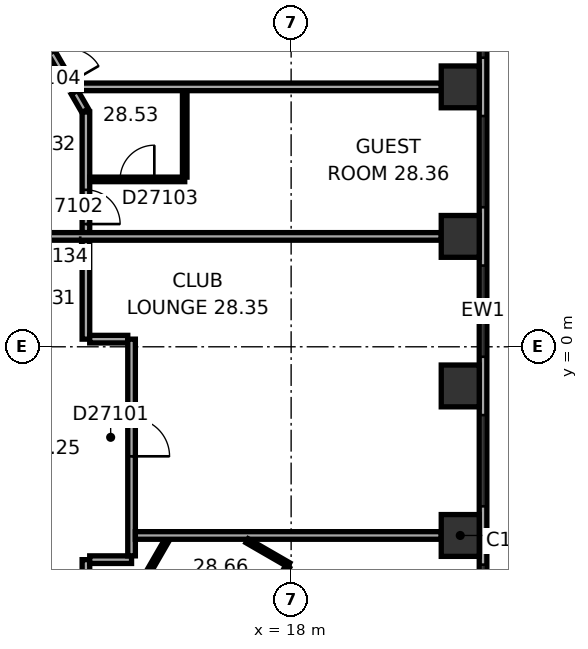
"""IFC4 building model, lengths in metres.
Left out: names, types, materials, properties, quantities, classifications, styles, units other than length and angle.
Written with IfcOpenShell. Run it as: python <this file> out.ifc"""

import sys

from ifc_helpers import new_model, si_unit, direction, frame, frame_2d, origin, origin_2d, place, context, subcontext, project, spatial, rectangle, extrude, element, fill, save


model = new_model("IFC4")
c1 = context("Model", 3, precision=1e-05, world=origin(), true_north=direction((0.0, 1.0)))
c2 = subcontext(c1, "Body", "Model", "MODEL_VIEW")
j1 = project(units=[si_unit("LENGTHUNIT", "METRE"), si_unit("PLANEANGLEUNIT", "RADIAN")], contexts=[c1])
p1 = place(None, origin())
s1 = spatial("IfcSite", under=j1, at=p1, CompositionType="ELEMENT")
p2 = place(p1, origin())
s2 = spatial("IfcBuilding", under=s1, at=p2, CompositionType="ELEMENT")
p3 = place(p2, frame((0.0, 0.0, 116.6)))
s3 = spatial("IfcBuildingStorey", under=s2, at=p3, CompositionType="ELEMENT", Elevation=116.6)
for number, where, z_axis, x_axis in (
    (1, (22.45, -4.965, 0.0), (0.0, 0.0, 1.0), (0.0, 1.0, 0.0)),
    (2, (22.45, -1.03, 0.0), (0.0, 0.0, 1.0), (0.0, 1.0, 0.0)),
    (3, (22.45, 2.905, 0.0), (0.0, 0.0, 1.0), (0.0, 1.0, 0.0)),
    (4, (22.45, 6.839, 0.0), (0.0, 0.0, 1.0), (0.0, 1.0, 0.0)),
):
    element("IfcColumn", number, at=place(p3, frame(where, z_axis=z_axis, x_axis=x_axis)), inside=s3, PredefinedType="COLUMN", context=c2, shape_type="SweptSolid", body=[
        extrude(rectangle(XDim=1.1, YDim=1.0, at=origin_2d()), origin(), (0.0, 0.0, 1.0), 3.3),
    ])
p4 = place(p3, frame((23.05, -9.687, 0.0), z_axis=(0.0, 0.0, 1.0), x_axis=(0.0, 1.0, 0.0)))
e5 = element("IfcWall", 5, at=p4, inside=s3, PredefinedType="STANDARD", context=c2, shape_type="SweptSolid", body=[
    extrude(rectangle(XDim=21.246, YDim=0.2, at=frame_2d((10.623, 0.0))), origin(), (0.0, 0.0, 1.0), 3.3),
])
p5 = place(p4, frame((1.555, 0.0, 0.8)))
e6 = element("IfcOpeningElement", 6, at=p5, cuts=e5, PredefinedType="OPENING", context=c2, shape_type="SweptSolid", body=[
    extrude(rectangle(XDim=2.4, YDim=1.7, at=frame_2d((1.2, 0.85))), frame((0.0, 0.11, 0.0), z_axis=(0.0, -1.0, 0.0), x_axis=(1.0, 0.0, 0.0)), (0.0, 0.0, 1.0), 0.22),
])
p6 = place(p4, frame((5.489, 0.0, 0.8)))
e7 = element("IfcOpeningElement", 7, at=p6, cuts=e5, PredefinedType="OPENING", context=c2, shape_type="SweptSolid", body=[
    extrude(rectangle(XDim=2.4, YDim=1.7, at=frame_2d((1.2, 0.85))), frame((0.0, 0.11, 0.0), z_axis=(0.0, -1.0, 0.0), x_axis=(1.0, 0.0, 0.0)), (0.0, 0.0, 1.0), 0.22),
])
p7 = place(p4, frame((9.424, 0.0, 0.8)))
e8 = element("IfcOpeningElement", 8, at=p7, cuts=e5, PredefinedType="OPENING", context=c2, shape_type="SweptSolid", body=[
    extrude(rectangle(XDim=2.4, YDim=1.7, at=frame_2d((1.2, 0.85))), frame((0.0, 0.11, 0.0), z_axis=(0.0, -1.0, 0.0), x_axis=(1.0, 0.0, 0.0)), (0.0, 0.0, 1.0), 0.22),
])
p8 = place(p4, frame((13.358, 0.0, 0.8)))
e9 = element("IfcOpeningElement", 9, at=p8, cuts=e5, PredefinedType="OPENING", context=c2, shape_type="SweptSolid", body=[
    extrude(rectangle(XDim=2.4, YDim=1.7, at=frame_2d((1.2, 0.85))), frame((0.0, 0.11, 0.0), z_axis=(0.0, -1.0, 0.0), x_axis=(1.0, 0.0, 0.0)), (0.0, 0.0, 1.0), 0.22),
])
p9 = place(p4, frame((17.293, 0.0, 0.8)))
e10 = element("IfcOpeningElement", 10, at=p9, cuts=e5, PredefinedType="OPENING", context=c2, shape_type="SweptSolid", body=[
    extrude(rectangle(XDim=2.4, YDim=1.7, at=frame_2d((1.2, 0.85))), frame((0.0, 0.11, 0.0), z_axis=(0.0, -1.0, 0.0), x_axis=(1.0, 0.0, 0.0)), (0.0, 0.0, 1.0), 0.22),
])
p10 = place(p3, frame((12.218, 6.839, 0.0), z_axis=(0.0, 0.0, 1.0), x_axis=(-0.500044870432, 0.865999496279, 0.0)))
e11 = element("IfcWall", 11, at=p10, inside=s3, PredefinedType="PARTITIONING", context=c2, shape_type="SweptSolid", body=[
    extrude(rectangle(XDim=1.136, YDim=0.2, at=frame_2d((0.568, 0.0))), origin(), (0.0, 0.0, 1.0), 2.95),
])
p11 = place(p10, frame((0.118, 0.0, 0.0)))
e12 = element("IfcOpeningElement", 12, at=p11, cuts=e11, PredefinedType="OPENING", context=c2, shape_type="SweptSolid", body=[
    extrude(rectangle(XDim=0.9, YDim=2.1, at=frame_2d((0.45, 1.05))), frame((0.0, 0.11, 0.0), z_axis=(0.0, -1.0, 0.0), x_axis=(1.0, 0.0, 0.0)), (0.0, 0.0, 1.0), 0.22),
])
p12 = place(p3, frame((12.58, 6.212, 0.0), z_axis=(0.0, 0.0, 1.0), x_axis=(-0.499936258447, 0.86606220186, 0.0)))
e13 = element("IfcWall", 13, at=p12, inside=s3, PredefinedType="PARTITIONING", context=c2, shape_type="SweptSolid", body=[
    extrude(rectangle(XDim=0.56, YDim=0.2, at=frame_2d((0.28, 0.0))), origin(), (0.0, 0.0, 1.0), 2.95),
])
p13 = place(p3, frame((12.6, -6.138, 0.0), z_axis=(0.0, 0.0, 1.0), x_axis=(0.0, 1.0, 0.0)))
e14 = element("IfcWall", 14, at=p13, inside=s3, PredefinedType="PARTITIONING", context=c2, shape_type="SweptSolid", body=[
    extrude(rectangle(XDim=0.537, YDim=0.2, at=frame_2d((0.268, 0.0))), origin(), (0.0, 0.0, 1.0), 2.95),
])
p14 = place(p3, frame((12.6, 0.201, 0.0), z_axis=(0.0, 0.0, 1.0), x_axis=(0.0, 1.0, 0.0)))
e15 = element("IfcWall", 15, at=p14, inside=s3, PredefinedType="PARTITIONING", context=c2, shape_type="SweptSolid", body=[
    extrude(rectangle(XDim=2.604, YDim=0.2, at=frame_2d((1.302, 0.0))), origin(), (0.0, 0.0, 1.0), 2.95),
])
p15 = place(p3, frame((12.6, 3.004, 0.0), z_axis=(0.0, 0.0, 1.0), x_axis=(0.0, 1.0, 0.0)))
e16 = element("IfcWall", 16, at=p15, inside=s3, PredefinedType="PARTITIONING", context=c2, shape_type="SweptSolid", body=[
    extrude(rectangle(XDim=3.173, YDim=0.2, at=frame_2d((1.586, 0.0))), origin(), (0.0, 0.0, 1.0), 2.95),
])
p16 = place(p15, frame((0.225, 0.0, 0.0)))
e17 = element("IfcOpeningElement", 17, at=p16, cuts=e16, PredefinedType="OPENING", context=c2, shape_type="SweptSolid", body=[
    extrude(rectangle(XDim=0.9, YDim=2.1, at=frame_2d((0.45, 1.05))), frame((0.0, 0.11, 0.0), z_axis=(0.0, -1.0, 0.0), x_axis=(1.0, 0.0, 0.0)), (0.0, 0.0, 1.0), 0.22),
])
p17 = place(p3, frame((12.7, -5.601, 0.0), z_axis=(0.0, 0.0, 1.0), x_axis=(1.0, 0.0, 0.0)))
e18 = element("IfcWall", 18, at=p17, inside=s3, PredefinedType="PARTITIONING", context=c2, shape_type="SweptSolid", body=[
    extrude(rectangle(XDim=1.101, YDim=0.2, at=frame_2d((0.551, 0.0))), origin(), (0.0, 0.0, 1.0), 2.95),
])
p18 = place(p3, frame((13.701, 0.201, 0.0), z_axis=(0.0, 0.0, 1.0), x_axis=(-1.0, 0.0, 0.0)))
e19 = element("IfcWall", 19, at=p18, inside=s3, PredefinedType="PARTITIONING", context=c2, shape_type="SweptSolid", body=[
    extrude(rectangle(XDim=1.001, YDim=0.2, at=frame_2d((0.5, 0.0))), origin(), (0.0, 0.0, 1.0), 2.95),
])
p19 = place(p3, frame((13.801, -5.501, 0.0), z_axis=(0.0, 0.0, 1.0), x_axis=(0.0, 1.0, 0.0)))
e20 = element("IfcWall", 20, at=p19, inside=s3, PredefinedType="PARTITIONING", context=c2, shape_type="SweptSolid", body=[
    extrude(rectangle(XDim=5.702, YDim=0.2, at=frame_2d((2.851, 0.0))), origin(), (0.0, 0.0, 1.0), 2.95),
])
p20 = place(p19, frame((2.619, 0.0, 0.0)))
e21 = element("IfcOpeningElement", 21, at=p20, cuts=e20, PredefinedType="OPENING", context=c2, shape_type="SweptSolid", body=[
    extrude(rectangle(XDim=1.0, YDim=2.1, at=frame_2d((0.5, 1.05))), frame((0.0, 0.11, 0.0), z_axis=(0.0, -1.0, 0.0), x_axis=(1.0, 0.0, 0.0)), (0.0, 0.0, 1.0), 0.22),
])
p21 = place(p3, frame((13.901, -6.524, 0.0), z_axis=(0.0, 0.0, 1.0), x_axis=(0.499964162598, 0.86604609353, 0.0)))
e22 = element("IfcWall", 22, at=p21, inside=s3, PredefinedType="PARTITIONING", context=c2, shape_type="SweptSolid", body=[
    extrude(rectangle(XDim=1.661, YDim=0.12, at=frame_2d((0.831, 0.0))), origin(), (0.0, 0.0, 1.0), 2.95),
])
p22 = place(p3, frame((13.901, -4.965, 0.0), z_axis=(0.0, 0.0, 1.0), x_axis=(1.0, 0.0, 0.0)))
e23 = element("IfcWall", 23, at=p22, inside=s3, PredefinedType="PARTITIONING", context=c2, shape_type="SweptSolid", body=[
    extrude(rectangle(XDim=8.049, YDim=0.2, at=frame_2d((4.024, 0.0))), origin(), (0.0, 0.0, 1.0), 2.95),
])
p23 = place(p3, frame((15.2, 4.405, 0.0), z_axis=(0.0, 0.0, 1.0), x_axis=(-1.0, 0.0, 0.0)))
e24 = element("IfcWall", 24, at=p23, inside=s3, PredefinedType="PARTITIONING", context=c2, shape_type="SweptSolid", body=[
    extrude(rectangle(XDim=2.5, YDim=0.12, at=frame_2d((1.25, 0.0))), origin(), (0.0, 0.0, 1.0), 2.95),
])
p24 = place(p23, frame((0.8, 0.0, 0.0)))
e25 = element("IfcOpeningElement", 25, at=p24, cuts=e24, PredefinedType="OPENING", context=c2, shape_type="SweptSolid", body=[
    extrude(rectangle(XDim=0.9, YDim=2.1, at=frame_2d((0.45, 1.05))), frame((0.0, 0.07, 0.0), z_axis=(0.0, -1.0, 0.0), x_axis=(1.0, 0.0, 0.0)), (0.0, 0.0, 1.0), 0.14),
])
p25 = place(p3, frame((15.2, 6.739, 0.0), z_axis=(0.0, 0.0, 1.0), x_axis=(0.0, -1.0, 0.0)))
e26 = element("IfcWall", 26, at=p25, inside=s3, PredefinedType="PARTITIONING", context=c2, shape_type="SweptSolid", body=[
    extrude(rectangle(XDim=2.274, YDim=0.12, at=frame_2d((1.137, 0.0))), origin(), (0.0, 0.0, 1.0), 2.95),
])
p26 = place(p3, frame((16.841, -5.104, 0.0), z_axis=(0.0, 0.0, 1.0), x_axis=(0.865998956469, -0.500045805297, 0.0)))
e27 = element("IfcWall", 27, at=p26, inside=s3, PredefinedType="PARTITIONING", context=c2, shape_type="SweptSolid", body=[
    extrude(rectangle(XDim=1.264, YDim=0.12, at=frame_2d((0.632, 0.0))), origin(), (0.0, 0.0, 1.0), 2.95),
])
p27 = place(p3, frame((17.906, -5.788, 0.0), z_axis=(0.0, 0.0, 1.0), x_axis=(-0.500047388771, -0.865998042136, 0.0)))
e28 = element("IfcWall", 28, at=p27, inside=s3, PredefinedType="PARTITIONING", context=c2, shape_type="SweptSolid", body=[
    extrude(rectangle(XDim=2.58, YDim=0.12, at=frame_2d((1.29, 0.0))), origin(), (0.0, 0.0, 1.0), 2.95),
])
p28 = place(p3, frame((21.95, 2.905, 0.0), z_axis=(0.0, 0.0, 1.0), x_axis=(-1.0, 0.0, 0.0)))
e29 = element("IfcWall", 29, at=p28, inside=s3, PredefinedType="PARTITIONING", context=c2, shape_type="SweptSolid", body=[
    extrude(rectangle(XDim=11.25, YDim=0.2, at=frame_2d((5.625, 0.0))), origin(), (0.0, 0.0, 1.0), 2.95),
])
p29 = place(p28, frame((9.5, 0.0, 0.0)))
e30 = element("IfcOpeningElement", 30, at=p29, cuts=e29, PredefinedType="OPENING", context=c2, shape_type="SweptSolid", body=[
    extrude(rectangle(XDim=1.6, YDim=2.1, at=frame_2d((0.8, 1.05))), frame((0.0, 0.11, 0.0), z_axis=(0.0, -1.0, 0.0), x_axis=(1.0, 0.0, 0.0)), (0.0, 0.0, 1.0), 0.22),
])
p30 = place(p3, frame((21.95, 6.839, 0.0), z_axis=(0.0, 0.0, 1.0), x_axis=(-1.0, 0.0, 0.0)))
e31 = element("IfcWall", 31, at=p30, inside=s3, PredefinedType="PARTITIONING", context=c2, shape_type="SweptSolid", body=[
    extrude(rectangle(XDim=9.65, YDim=0.2, at=frame_2d((4.825, 0.0))), origin(), (0.0, 0.0, 1.0), 2.95),
])
p31 = place(p5, origin())
e32 = element("IfcWindow", 32, at=p31, inside=s3, PartitioningType="SINGLE_PANEL", PredefinedType="WINDOW", context=c2, shape_type="SweptSolid", body=[
    extrude(rectangle(XDim=2.4, YDim=1.7, at=frame_2d((1.2, 0.85))), frame((0.0, 0.03, 0.0), z_axis=(0.0, -1.0, 0.0), x_axis=(1.0, 0.0, 0.0)), (0.0, 0.0, 1.0), 0.06),
])
fill(e6, e32)
p32 = place(p6, origin())
e33 = element("IfcWindow", 33, at=p32, inside=s3, PartitioningType="SINGLE_PANEL", PredefinedType="WINDOW", context=c2, shape_type="SweptSolid", body=[
    extrude(rectangle(XDim=2.4, YDim=1.7, at=frame_2d((1.2, 0.85))), frame((0.0, 0.03, 0.0), z_axis=(0.0, -1.0, 0.0), x_axis=(1.0, 0.0, 0.0)), (0.0, 0.0, 1.0), 0.06),
])
fill(e7, e33)
p33 = place(p7, origin())
e34 = element("IfcWindow", 34, at=p33, inside=s3, PartitioningType="SINGLE_PANEL", PredefinedType="WINDOW", context=c2, shape_type="SweptSolid", body=[
    extrude(rectangle(XDim=2.4, YDim=1.7, at=frame_2d((1.2, 0.85))), frame((0.0, 0.03, 0.0), z_axis=(0.0, -1.0, 0.0), x_axis=(1.0, 0.0, 0.0)), (0.0, 0.0, 1.0), 0.06),
])
fill(e8, e34)
p34 = place(p8, origin())
e35 = element("IfcWindow", 35, at=p34, inside=s3, PartitioningType="SINGLE_PANEL", PredefinedType="WINDOW", context=c2, shape_type="SweptSolid", body=[
    extrude(rectangle(XDim=2.4, YDim=1.7, at=frame_2d((1.2, 0.85))), frame((0.0, 0.03, 0.0), z_axis=(0.0, -1.0, 0.0), x_axis=(1.0, 0.0, 0.0)), (0.0, 0.0, 1.0), 0.06),
])
fill(e9, e35)
p35 = place(p9, origin())
e36 = element("IfcWindow", 36, at=p35, inside=s3, PartitioningType="SINGLE_PANEL", PredefinedType="WINDOW", context=c2, shape_type="SweptSolid", body=[
    extrude(rectangle(XDim=2.4, YDim=1.7, at=frame_2d((1.2, 0.85))), frame((0.0, 0.03, 0.0), z_axis=(0.0, -1.0, 0.0), x_axis=(1.0, 0.0, 0.0)), (0.0, 0.0, 1.0), 0.06),
])
fill(e10, e36)
p36 = place(p20, origin())
e37 = element("IfcDoor", 37, at=p36, inside=s3, OperationType="SINGLE_SWING_LEFT", PredefinedType="DOOR", context=c2, shape_type="SweptSolid", body=[
    extrude(rectangle(XDim=1.0, YDim=2.1, at=frame_2d((0.5, 1.05))), frame((0.0, 0.025, 0.0), z_axis=(0.0, -1.0, 0.0), x_axis=(1.0, 0.0, 0.0)), (0.0, 0.0, 1.0), 0.05),
])
fill(e21, e37)
p37 = place(p16, origin())
e38 = element("IfcDoor", 38, at=p37, inside=s3, OperationType="SINGLE_SWING_LEFT", PredefinedType="DOOR", context=c2, shape_type="SweptSolid", body=[
    extrude(rectangle(XDim=0.9, YDim=2.1, at=frame_2d((0.45, 1.05))), frame((0.0, 0.025, 0.0), z_axis=(0.0, -1.0, 0.0), x_axis=(1.0, 0.0, 0.0)), (0.0, 0.0, 1.0), 0.05),
])
fill(e17, e38)
p38 = place(p24, origin())
e39 = element("IfcDoor", 39, at=p38, inside=s3, OperationType="SINGLE_SWING_LEFT", PredefinedType="DOOR", context=c2, shape_type="SweptSolid", body=[
    extrude(rectangle(XDim=0.9, YDim=2.1, at=frame_2d((0.45, 1.05))), frame((0.0, 0.025, 0.0), z_axis=(0.0, -1.0, 0.0), x_axis=(1.0, 0.0, 0.0)), (0.0, 0.0, 1.0), 0.05),
])
fill(e25, e39)
p39 = place(p11, origin())
e40 = element("IfcDoor", 40, at=p39, inside=s3, OperationType="SINGLE_SWING_LEFT", PredefinedType="DOOR", context=c2, shape_type="SweptSolid", body=[
    extrude(rectangle(XDim=0.9, YDim=2.1, at=frame_2d((0.45, 1.05))), frame((0.0, 0.025, 0.0), z_axis=(0.0, -1.0, 0.0), x_axis=(1.0, 0.0, 0.0)), (0.0, 0.0, 1.0), 0.05),
])
fill(e12, e40)
p40 = place(p29, origin())
e41 = element("IfcDoor", 41, at=p40, inside=s3, OperationType="DOUBLE_DOOR_SINGLE_SWING", PredefinedType="DOOR", context=c2, shape_type="SweptSolid", body=[
    extrude(rectangle(XDim=1.6, YDim=2.1, at=frame_2d((0.8, 1.05))), frame((0.0, 0.025, 0.0), z_axis=(0.0, -1.0, 0.0), x_axis=(1.0, 0.0, 0.0)), (0.0, 0.0, 1.0), 0.05),
])
fill(e30, e41)
save(model, sys.argv[1])
